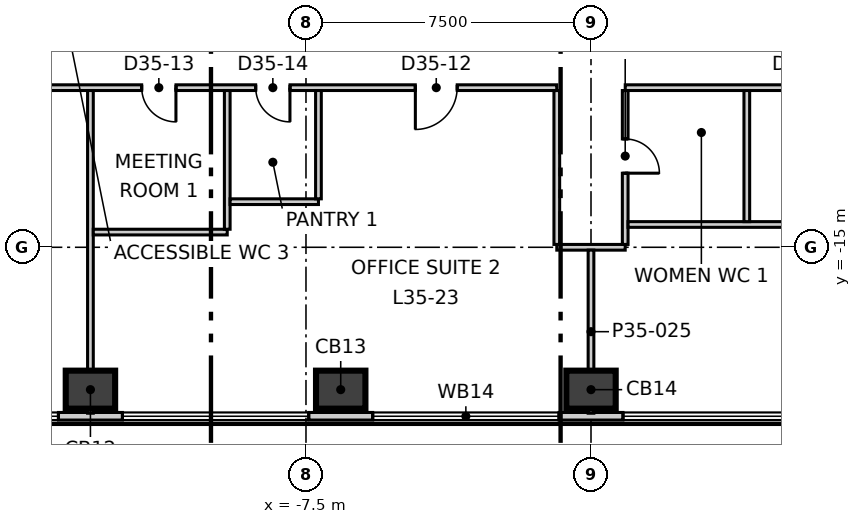
"""IFC4 building model, lengths in metres.
Left out: names, types, materials, properties, quantities, classifications, styles, units other than length and angle.
Written with IfcOpenShell. Run it as: python <this file> out.ifc"""

import sys

from ifc_helpers import new_model, si_unit, direction, frame, frame_2d, origin, origin_2d, place, context, subcontext, project, spatial, rectangle, extrude, element, fill, save


model = new_model("IFC4")
c1 = context("Model", 3, precision=1e-05, world=origin(), true_north=direction((0.0, 1.0)))
c2 = subcontext(c1, "Body", "Model", "MODEL_VIEW")
j1 = project(units=[si_unit("LENGTHUNIT", "METRE"), si_unit("PLANEANGLEUNIT", "RADIAN")], contexts=[c1])
p1 = place(None, origin())
s1 = spatial("IfcSite", under=j1, at=p1, CompositionType="ELEMENT")
p2 = place(p1, origin())
s2 = spatial("IfcBuilding", under=s1, at=p2, CompositionType="ELEMENT")
p3 = place(p2, frame((0.0, 0.0, 152.3)))
s3 = spatial("IfcBuildingStorey", under=s2, at=p3, CompositionType="ELEMENT", Elevation=152.3)
for number, where, z_axis, x_axis in (
    (1, (-13.172, -18.746, -0.3), (0.0, 0.0, 1.0), (1.0, 0.0, 0.0)),
    (2, (-6.586, -18.746, -0.3), (0.0, 0.0, 1.0), (1.0, 0.0, 0.0)),
    (3, (0.0, -18.746, -0.3), (0.0, 0.0, 1.0), (1.0, 0.0, 0.0)),
):
    element("IfcColumn", number, at=place(p3, frame(where, z_axis=z_axis, x_axis=x_axis)), inside=s3, PredefinedType="COLUMN", context=c2, shape_type="SweptSolid", body=[
        extrude(rectangle(XDim=1.3, YDim=1.0, at=origin_2d()), origin(), (0.0, 0.0, 1.0), 4.0),
    ])
p4 = place(p3, frame((-3.018, 33.666, 0.0), z_axis=(0.0, 0.0, 1.0), x_axis=(-0.499984613623, -0.866034286931, 0.0)))
e4 = element("IfcWall", 4, at=p4, inside=s3, PredefinedType="ELEMENTEDWALL", context=c2, shape_type="SweptSolid", body=[
    extrude(rectangle(XDim=55.274, YDim=0.2, at=frame_2d((27.637, 0.0))), origin(), (0.0, 0.0, 1.0), 3.7),
])
p5 = place(p4, frame((2.145, 0.0, 0.9)))
e5 = element("IfcOpeningElement", 5, at=p5, cuts=e4, PredefinedType="OPENING", context=c2, shape_type="SweptSolid", body=[
    extrude(rectangle(XDim=4.9, YDim=2.5, at=frame_2d((2.45, 1.25))), frame((0.0, 0.11, 0.0), z_axis=(0.0, -1.0, 0.0), x_axis=(1.0, 0.0, 0.0)), (0.0, 0.0, 1.0), 0.22),
])
p6 = place(p4, frame((8.731, 0.0, 0.9)))
e6 = element("IfcOpeningElement", 6, at=p6, cuts=e4, PredefinedType="OPENING", context=c2, shape_type="SweptSolid", body=[
    extrude(rectangle(XDim=4.9, YDim=2.5, at=frame_2d((2.45, 1.25))), frame((0.0, 0.11, 0.0), z_axis=(0.0, -1.0, 0.0), x_axis=(1.0, 0.0, 0.0)), (0.0, 0.0, 1.0), 0.22),
])
p7 = place(p4, frame((15.318, 0.0, 0.9)))
e7 = element("IfcOpeningElement", 7, at=p7, cuts=e4, PredefinedType="OPENING", context=c2, shape_type="SweptSolid", body=[
    extrude(rectangle(XDim=4.9, YDim=2.5, at=frame_2d((2.45, 1.25))), frame((0.0, 0.11, 0.0), z_axis=(0.0, -1.0, 0.0), x_axis=(1.0, 0.0, 0.0)), (0.0, 0.0, 1.0), 0.22),
])
p8 = place(p4, frame((21.904, 0.0, 0.9)))
e8 = element("IfcOpeningElement", 8, at=p8, cuts=e4, PredefinedType="OPENING", context=c2, shape_type="SweptSolid", body=[
    extrude(rectangle(XDim=4.9, YDim=2.5, at=frame_2d((2.45, 1.25))), frame((0.0, 0.11, 0.0), z_axis=(0.0, -1.0, 0.0), x_axis=(1.0, 0.0, 0.0)), (0.0, 0.0, 1.0), 0.22),
])
p9 = place(p4, frame((28.49, 0.0, 0.9)))
e9 = element("IfcOpeningElement", 9, at=p9, cuts=e4, PredefinedType="OPENING", context=c2, shape_type="SweptSolid", body=[
    extrude(rectangle(XDim=4.9, YDim=2.5, at=frame_2d((2.45, 1.25))), frame((0.0, 0.11, 0.0), z_axis=(0.0, -1.0, 0.0), x_axis=(1.0, 0.0, 0.0)), (0.0, 0.0, 1.0), 0.22),
])
p10 = place(p4, frame((35.076, 0.0, 0.9)))
e10 = element("IfcOpeningElement", 10, at=p10, cuts=e4, PredefinedType="OPENING", context=c2, shape_type="SweptSolid", body=[
    extrude(rectangle(XDim=4.9, YDim=2.5, at=frame_2d((2.45, 1.25))), frame((0.0, 0.11, 0.0), z_axis=(0.0, -1.0, 0.0), x_axis=(1.0, 0.0, 0.0)), (0.0, 0.0, 1.0), 0.22),
])
p11 = place(p4, frame((41.662, 0.0, 0.9)))
e11 = element("IfcOpeningElement", 11, at=p11, cuts=e4, PredefinedType="OPENING", context=c2, shape_type="SweptSolid", body=[
    extrude(rectangle(XDim=4.9, YDim=2.5, at=frame_2d((2.45, 1.25))), frame((0.0, 0.11, 0.0), z_axis=(0.0, -1.0, 0.0), x_axis=(1.0, 0.0, 0.0)), (0.0, 0.0, 1.0), 0.22),
])
p12 = place(p4, frame((48.248, 0.0, 0.9)))
e12 = element("IfcOpeningElement", 12, at=p12, cuts=e4, PredefinedType="OPENING", context=c2, shape_type="SweptSolid", body=[
    extrude(rectangle(XDim=4.9, YDim=2.5, at=frame_2d((2.45, 1.25))), frame((0.0, 0.11, 0.0), z_axis=(0.0, -1.0, 0.0), x_axis=(1.0, 0.0, 0.0)), (0.0, 0.0, 1.0), 0.22),
])
p13 = place(p3, frame((-27.647, -19.446, 0.0), z_axis=(0.0, 0.0, 1.0), x_axis=(1.0, 0.0, 0.0)))
e13 = element("IfcWall", 13, at=p13, inside=s3, PredefinedType="ELEMENTEDWALL", context=c2, shape_type="SweptSolid", body=[
    extrude(rectangle(XDim=55.274, YDim=0.2, at=frame_2d((27.637, 0.0))), origin(), (0.0, 0.0, 1.0), 3.7),
])
p14 = place(p13, frame((2.146, 0.0, 0.9)))
e14 = element("IfcOpeningElement", 14, at=p14, cuts=e13, PredefinedType="OPENING", context=c2, shape_type="SweptSolid", body=[
    extrude(rectangle(XDim=4.9, YDim=2.5, at=frame_2d((2.45, 1.25))), frame((0.0, 0.11, 0.0), z_axis=(0.0, -1.0, 0.0), x_axis=(1.0, 0.0, 0.0)), (0.0, 0.0, 1.0), 0.22),
])
p15 = place(p13, frame((8.732, 0.0, 0.9)))
e15 = element("IfcOpeningElement", 15, at=p15, cuts=e13, PredefinedType="OPENING", context=c2, shape_type="SweptSolid", body=[
    extrude(rectangle(XDim=4.9, YDim=2.5, at=frame_2d((2.45, 1.25))), frame((0.0, 0.11, 0.0), z_axis=(0.0, -1.0, 0.0), x_axis=(1.0, 0.0, 0.0)), (0.0, 0.0, 1.0), 0.22),
])
p16 = place(p13, frame((15.318, 0.0, 0.9)))
e16 = element("IfcOpeningElement", 16, at=p16, cuts=e13, PredefinedType="OPENING", context=c2, shape_type="SweptSolid", body=[
    extrude(rectangle(XDim=4.9, YDim=2.5, at=frame_2d((2.45, 1.25))), frame((0.0, 0.11, 0.0), z_axis=(0.0, -1.0, 0.0), x_axis=(1.0, 0.0, 0.0)), (0.0, 0.0, 1.0), 0.22),
])
p17 = place(p13, frame((21.904, 0.0, 0.9)))
e17 = element("IfcOpeningElement", 17, at=p17, cuts=e13, PredefinedType="OPENING", context=c2, shape_type="SweptSolid", body=[
    extrude(rectangle(XDim=4.9, YDim=2.5, at=frame_2d((2.45, 1.25))), frame((0.0, 0.11, 0.0), z_axis=(0.0, -1.0, 0.0), x_axis=(1.0, 0.0, 0.0)), (0.0, 0.0, 1.0), 0.22),
])
p18 = place(p13, frame((28.49, 0.0, 0.9)))
e18 = element("IfcOpeningElement", 18, at=p18, cuts=e13, PredefinedType="OPENING", context=c2, shape_type="SweptSolid", body=[
    extrude(rectangle(XDim=4.9, YDim=2.5, at=frame_2d((2.45, 1.25))), frame((0.0, 0.11, 0.0), z_axis=(0.0, -1.0, 0.0), x_axis=(1.0, 0.0, 0.0)), (0.0, 0.0, 1.0), 0.22),
])
p19 = place(p13, frame((35.076, 0.0, 0.9)))
e19 = element("IfcOpeningElement", 19, at=p19, cuts=e13, PredefinedType="OPENING", context=c2, shape_type="SweptSolid", body=[
    extrude(rectangle(XDim=4.9, YDim=2.5, at=frame_2d((2.45, 1.25))), frame((0.0, 0.11, 0.0), z_axis=(0.0, -1.0, 0.0), x_axis=(1.0, 0.0, 0.0)), (0.0, 0.0, 1.0), 0.22),
])
p20 = place(p13, frame((41.662, 0.0, 0.9)))
e20 = element("IfcOpeningElement", 20, at=p20, cuts=e13, PredefinedType="OPENING", context=c2, shape_type="SweptSolid", body=[
    extrude(rectangle(XDim=4.9, YDim=2.5, at=frame_2d((2.45, 1.25))), frame((0.0, 0.11, 0.0), z_axis=(0.0, -1.0, 0.0), x_axis=(1.0, 0.0, 0.0)), (0.0, 0.0, 1.0), 0.22),
])
p21 = place(p13, frame((48.248, 0.0, 0.9)))
e21 = element("IfcOpeningElement", 21, at=p21, cuts=e13, PredefinedType="OPENING", context=c2, shape_type="SweptSolid", body=[
    extrude(rectangle(XDim=4.9, YDim=2.5, at=frame_2d((2.45, 1.25))), frame((0.0, 0.11, 0.0), z_axis=(0.0, -1.0, 0.0), x_axis=(1.0, 0.0, 0.0)), (0.0, 0.0, 1.0), 0.22),
])
p22 = place(p3, frame((30.664, -14.22, 0.0), z_axis=(0.0, 0.0, 1.0), x_axis=(-0.499984613623, 0.866034286931, 0.0)))
e22 = element("IfcWall", 22, at=p22, inside=s3, PredefinedType="ELEMENTEDWALL", context=c2, shape_type="SweptSolid", body=[
    extrude(rectangle(XDim=55.274, YDim=0.2, at=frame_2d((27.637, 0.0))), origin(), (0.0, 0.0, 1.0), 3.7),
])
p23 = place(p22, frame((2.146, 0.0, 0.9)))
e23 = element("IfcOpeningElement", 23, at=p23, cuts=e22, PredefinedType="OPENING", context=c2, shape_type="SweptSolid", body=[
    extrude(rectangle(XDim=4.9, YDim=2.5, at=frame_2d((2.45, 1.25))), frame((0.0, 0.11, 0.0), z_axis=(0.0, -1.0, 0.0), x_axis=(1.0, 0.0, 0.0)), (0.0, 0.0, 1.0), 0.22),
])
p24 = place(p22, frame((8.732, 0.0, 0.9)))
e24 = element("IfcOpeningElement", 24, at=p24, cuts=e22, PredefinedType="OPENING", context=c2, shape_type="SweptSolid", body=[
    extrude(rectangle(XDim=4.9, YDim=2.5, at=frame_2d((2.45, 1.25))), frame((0.0, 0.11, 0.0), z_axis=(0.0, -1.0, 0.0), x_axis=(1.0, 0.0, 0.0)), (0.0, 0.0, 1.0), 0.22),
])
p25 = place(p22, frame((15.318, 0.0, 0.9)))
e25 = element("IfcOpeningElement", 25, at=p25, cuts=e22, PredefinedType="OPENING", context=c2, shape_type="SweptSolid", body=[
    extrude(rectangle(XDim=4.9, YDim=2.5, at=frame_2d((2.45, 1.25))), frame((0.0, 0.11, 0.0), z_axis=(0.0, -1.0, 0.0), x_axis=(1.0, 0.0, 0.0)), (0.0, 0.0, 1.0), 0.22),
])
p26 = place(p22, frame((21.904, 0.0, 0.9)))
e26 = element("IfcOpeningElement", 26, at=p26, cuts=e22, PredefinedType="OPENING", context=c2, shape_type="SweptSolid", body=[
    extrude(rectangle(XDim=4.9, YDim=2.5, at=frame_2d((2.45, 1.25))), frame((0.0, 0.11, 0.0), z_axis=(0.0, -1.0, 0.0), x_axis=(1.0, 0.0, 0.0)), (0.0, 0.0, 1.0), 0.22),
])
p27 = place(p22, frame((28.49, 0.0, 0.9)))
e27 = element("IfcOpeningElement", 27, at=p27, cuts=e22, PredefinedType="OPENING", context=c2, shape_type="SweptSolid", body=[
    extrude(rectangle(XDim=4.9, YDim=2.5, at=frame_2d((2.45, 1.25))), frame((0.0, 0.11, 0.0), z_axis=(0.0, -1.0, 0.0), x_axis=(1.0, 0.0, 0.0)), (0.0, 0.0, 1.0), 0.22),
])
p28 = place(p22, frame((35.076, 0.0, 0.9)))
e28 = element("IfcOpeningElement", 28, at=p28, cuts=e22, PredefinedType="OPENING", context=c2, shape_type="SweptSolid", body=[
    extrude(rectangle(XDim=4.9, YDim=2.5, at=frame_2d((2.45, 1.25))), frame((0.0, 0.11, 0.0), z_axis=(0.0, -1.0, 0.0), x_axis=(1.0, 0.0, 0.0)), (0.0, 0.0, 1.0), 0.22),
])
p29 = place(p22, frame((41.662, 0.0, 0.9)))
e29 = element("IfcOpeningElement", 29, at=p29, cuts=e22, PredefinedType="OPENING", context=c2, shape_type="SweptSolid", body=[
    extrude(rectangle(XDim=4.9, YDim=2.5, at=frame_2d((2.45, 1.25))), frame((0.0, 0.11, 0.0), z_axis=(0.0, -1.0, 0.0), x_axis=(1.0, 0.0, 0.0)), (0.0, 0.0, 1.0), 0.22),
])
p30 = place(p22, frame((48.248, 0.0, 0.9)))
e30 = element("IfcOpeningElement", 30, at=p30, cuts=e22, PredefinedType="OPENING", context=c2, shape_type="SweptSolid", body=[
    extrude(rectangle(XDim=4.9, YDim=2.5, at=frame_2d((2.45, 1.25))), frame((0.0, 0.11, 0.0), z_axis=(0.0, -1.0, 0.0), x_axis=(1.0, 0.0, 0.0)), (0.0, 0.0, 1.0), 0.22),
])
p31 = place(p3, frame((-18.556, -10.8, 0.0), z_axis=(0.0, 0.0, 1.0), x_axis=(1.0, 0.0, 0.0)))
e31 = element("IfcWall", 31, at=p31, inside=s3, PredefinedType="PARTITIONING", context=c2, shape_type="SweptSolid", body=[
    extrude(rectangle(XDim=17.655, YDim=0.15, at=frame_2d((8.828, 0.0))), origin(), (0.0, 0.0, 1.0), 3.7),
])
p32 = place(p31, frame((2.1, 0.0, 0.0)))
e32 = element("IfcOpeningElement", 32, at=p32, cuts=e31, PredefinedType="OPENING", context=c2, shape_type="SweptSolid", body=[
    extrude(rectangle(XDim=1.1, YDim=2.1, at=frame_2d((0.55, 1.05))), frame((0.0, 0.085, 0.0), z_axis=(0.0, -1.0, 0.0), x_axis=(1.0, 0.0, 0.0)), (0.0, 0.0, 1.0), 0.17),
])
p33 = place(p31, frame((13.934, 0.0, 0.0)))
e33 = element("IfcOpeningElement", 33, at=p33, cuts=e31, PredefinedType="OPENING", context=c2, shape_type="SweptSolid", body=[
    extrude(rectangle(XDim=1.1, YDim=2.1, at=frame_2d((0.55, 1.05))), frame((0.0, 0.085, 0.0), z_axis=(0.0, -1.0, 0.0), x_axis=(1.0, 0.0, 0.0)), (0.0, 0.0, 1.0), 0.17),
])
p34 = place(p31, frame((6.734, 0.0, 0.0)))
e34 = element("IfcOpeningElement", 34, at=p34, cuts=e31, PredefinedType="OPENING", context=c2, shape_type="SweptSolid", body=[
    extrude(rectangle(XDim=0.9, YDim=2.1, at=frame_2d((0.45, 1.05))), frame((0.0, 0.085, 0.0), z_axis=(0.0, -1.0, 0.0), x_axis=(1.0, 0.0, 0.0)), (0.0, 0.0, 1.0), 0.17),
])
p35 = place(p31, frame((9.734, 0.0, 0.0)))
e35 = element("IfcOpeningElement", 35, at=p35, cuts=e31, PredefinedType="OPENING", context=c2, shape_type="SweptSolid", body=[
    extrude(rectangle(XDim=0.9, YDim=2.1, at=frame_2d((0.45, 1.05))), frame((0.0, 0.085, 0.0), z_axis=(0.0, -1.0, 0.0), x_axis=(1.0, 0.0, 0.0)), (0.0, 0.0, 1.0), 0.17),
])
p36 = place(p3, frame((0.901, -10.8, 0.0), z_axis=(0.0, 0.0, 1.0), x_axis=(1.0, 0.0, 0.0)))
e36 = element("IfcWall", 36, at=p36, inside=s3, PredefinedType="PARTITIONING", context=c2, shape_type="SweptSolid", body=[
    extrude(rectangle(XDim=17.805, YDim=0.15, at=frame_2d((8.903, 0.0))), origin(), (0.0, 0.0, 1.0), 3.7),
])
p37 = place(p36, frame((9.949, 0.0, 0.0)))
e37 = element("IfcOpeningElement", 37, at=p37, cuts=e36, PredefinedType="OPENING", context=c2, shape_type="SweptSolid", body=[
    extrude(rectangle(XDim=1.1, YDim=2.1, at=frame_2d((0.55, 1.05))), frame((0.0, 0.085, 0.0), z_axis=(0.0, -1.0, 0.0), x_axis=(1.0, 0.0, 0.0)), (0.0, 0.0, 1.0), 0.17),
])
p38 = place(p36, frame((4.349, 0.0, 0.0)))
e38 = element("IfcOpeningElement", 38, at=p38, cuts=e36, PredefinedType="OPENING", context=c2, shape_type="SweptSolid", body=[
    extrude(rectangle(XDim=0.9, YDim=2.1, at=frame_2d((0.45, 1.05))), frame((0.0, 0.085, 0.0), z_axis=(0.0, -1.0, 0.0), x_axis=(1.0, 0.0, 0.0)), (0.0, 0.0, 1.0), 0.17),
])
p39 = place(p36, frame((7.049, 0.0, 0.0)))
e39 = element("IfcOpeningElement", 39, at=p39, cuts=e36, PredefinedType="OPENING", context=c2, shape_type="SweptSolid", body=[
    extrude(rectangle(XDim=1.0, YDim=2.1, at=frame_2d((0.5, 1.05))), frame((0.0, 0.085, 0.0), z_axis=(0.0, -1.0, 0.0), x_axis=(1.0, 0.0, 0.0)), (0.0, 0.0, 1.0), 0.17),
])
p40 = place(p36, frame((14.521, 0.0, 0.0)))
e40 = element("IfcOpeningElement", 40, at=p40, cuts=e36, PredefinedType="OPENING", context=c2, shape_type="SweptSolid", body=[
    extrude(rectangle(XDim=1.1, YDim=2.1, at=frame_2d((0.55, 1.05))), frame((0.0, 0.085, 0.0), z_axis=(0.0, -1.0, 0.0), x_axis=(1.0, 0.0, 0.0)), (0.0, 0.0, 1.0), 0.17),
])
p41 = place(p3, frame((-18.631, -10.67, 0.0), z_axis=(0.0, 0.0, 1.0), x_axis=(0.500017706633, 0.866015180614, 0.0)))
e41 = element("IfcWall", 41, at=p41, inside=s3, PredefinedType="PARTITIONING", context=c2, shape_type="SweptSolid", body=[
    extrude(rectangle(XDim=17.656, YDim=0.15, at=frame_2d((8.828, 0.0))), origin(), (0.0, 0.0, 1.0), 3.7),
])
p42 = place(p41, frame((6.606, 0.0, 0.0)))
e42 = element("IfcOpeningElement", 42, at=p42, cuts=e41, PredefinedType="OPENING", context=c2, shape_type="SweptSolid", body=[
    extrude(rectangle(XDim=1.1, YDim=2.1, at=frame_2d((0.55, 1.05))), frame((0.0, 0.085, 0.0), z_axis=(0.0, -1.0, 0.0), x_axis=(1.0, 0.0, 0.0)), (0.0, 0.0, 1.0), 0.17),
])
p43 = place(p41, frame((12.406, 0.0, 0.0)))
e43 = element("IfcOpeningElement", 43, at=p43, cuts=e41, PredefinedType="OPENING", context=c2, shape_type="SweptSolid", body=[
    extrude(rectangle(XDim=0.9, YDim=2.1, at=frame_2d((0.45, 1.05))), frame((0.0, 0.085, 0.0), z_axis=(0.0, -1.0, 0.0), x_axis=(1.0, 0.0, 0.0)), (0.0, 0.0, 1.0), 0.17),
])
p44 = place(p41, frame((9.606, 0.0, 0.0)))
e44 = element("IfcOpeningElement", 44, at=p44, cuts=e41, PredefinedType="OPENING", context=c2, shape_type="SweptSolid", body=[
    extrude(rectangle(XDim=1.0, YDim=2.1, at=frame_2d((0.5, 1.05))), frame((0.0, 0.085, 0.0), z_axis=(0.0, -1.0, 0.0), x_axis=(1.0, 0.0, 0.0)), (0.0, 0.0, 1.0), 0.17),
])
p45 = place(p41, frame((2.034, 0.0, 0.0)))
e45 = element("IfcOpeningElement", 45, at=p45, cuts=e41, PredefinedType="OPENING", context=c2, shape_type="SweptSolid", body=[
    extrude(rectangle(XDim=1.1, YDim=2.1, at=frame_2d((0.55, 1.05))), frame((0.0, 0.085, 0.0), z_axis=(0.0, -1.0, 0.0), x_axis=(1.0, 0.0, 0.0)), (0.0, 0.0, 1.0), 0.17),
])
p46 = place(p3, frame((-13.172, -19.366, 0.0), z_axis=(0.0, 0.0, 1.0), x_axis=(0.0, 1.0, 0.0)))
e46 = element("IfcWall", 46, at=p46, inside=s3, PredefinedType="PARTITIONING", context=c2, shape_type="SweptSolid", body=[
    extrude(rectangle(XDim=8.491, YDim=0.15, at=frame_2d((4.246, 0.0))), origin(), (0.0, 0.0, 1.0), 3.7),
])
p47 = place(p3, frame((-13.097, -14.6, 0.0), z_axis=(0.0, 0.0, 1.0), x_axis=(1.0, 0.0, 0.0)))
e47 = element("IfcWall", 47, at=p47, inside=s3, PredefinedType="PARTITIONING", context=c2, shape_type="SweptSolid", body=[
    extrude(rectangle(XDim=3.525, YDim=0.15, at=frame_2d((1.762, 0.0))), origin(), (0.0, 0.0, 1.0), 3.7),
])
p48 = place(p3, frame((-9.572, -14.525, 0.0), z_axis=(0.0, 0.0, 1.0), x_axis=(0.0, 1.0, 0.0)))
e48 = element("IfcWall", 48, at=p48, inside=s3, PredefinedType="PARTITIONING", context=c2, shape_type="SweptSolid", body=[
    extrude(rectangle(XDim=3.65, YDim=0.15, at=frame_2d((1.825, 0.0))), origin(), (0.0, 0.0, 1.0), 3.7),
])
p49 = place(p3, frame((-9.497, -13.8, 0.0), z_axis=(0.0, 0.0, 1.0), x_axis=(1.0, 0.0, 0.0)))
e49 = element("IfcWall", 49, at=p49, inside=s3, PredefinedType="PARTITIONING", context=c2, shape_type="SweptSolid", body=[
    extrude(rectangle(XDim=2.325, YDim=0.15, at=frame_2d((1.163, 0.0))), origin(), (0.0, 0.0, 1.0), 3.7),
])
p50 = place(p3, frame((-7.172, -13.725, 0.0), z_axis=(0.0, 0.0, 1.0), x_axis=(0.0, 1.0, 0.0)))
e50 = element("IfcWall", 50, at=p50, inside=s3, PredefinedType="PARTITIONING", context=c2, shape_type="SweptSolid", body=[
    extrude(rectangle(XDim=2.85, YDim=0.15, at=frame_2d((1.425, 0.0))), origin(), (0.0, 0.0, 1.0), 3.7),
])
p51 = place(p3, frame((-0.9, -15.0, 0.0), z_axis=(0.0, 0.0, 1.0), x_axis=(1.0, 0.0, 0.0)))
e51 = element("IfcWall", 51, at=p51, inside=s3, PredefinedType="PARTITIONING", context=c2, shape_type="SweptSolid", body=[
    extrude(rectangle(XDim=1.8, YDim=0.15, at=frame_2d((0.9, 0.0))), origin(), (0.0, 0.0, 1.0), 3.7),
])
p52 = place(p3, frame((-0.9, -14.925, 0.0), z_axis=(0.0, 0.0, 1.0), x_axis=(0.0, 1.0, 0.0)))
e52 = element("IfcWall", 52, at=p52, inside=s3, PredefinedType="PARTITIONING", context=c2, shape_type="SweptSolid", body=[
    extrude(rectangle(XDim=4.049, YDim=0.15, at=frame_2d((2.024, 0.0))), origin(), (0.0, 0.0, 1.0), 3.7),
])
p53 = place(p3, frame((0.0, -19.366, 0.0), z_axis=(0.0, 0.0, 1.0), x_axis=(0.0, 1.0, 0.0)))
e53 = element("IfcWall", 53, at=p53, inside=s3, PredefinedType="PARTITIONING", context=c2, shape_type="SweptSolid", body=[
    extrude(rectangle(XDim=4.291, YDim=0.15, at=frame_2d((2.146, 0.0))), origin(), (0.0, 0.0, 1.0), 3.2),
])
p54 = place(p3, frame((0.9, -14.925, 0.0), z_axis=(0.0, 0.0, 1.0), x_axis=(0.0, 1.0, 0.0)))
e54 = element("IfcWall", 54, at=p54, inside=s3, PredefinedType="PARTITIONING", context=c2, shape_type="SweptSolid", body=[
    extrude(rectangle(XDim=4.049, YDim=0.15, at=frame_2d((2.024, 0.0))), origin(), (0.0, 0.0, 1.0), 3.7),
])
p55 = place(p54, frame((1.875, 0.0, 0.0)))
e55 = element("IfcOpeningElement", 55, at=p55, cuts=e54, PredefinedType="OPENING", context=c2, shape_type="SweptSolid", body=[
    extrude(rectangle(XDim=0.9, YDim=2.1, at=frame_2d((0.45, 1.05))), frame((0.0, 0.085, 0.0), z_axis=(0.0, -1.0, 0.0), x_axis=(1.0, 0.0, 0.0)), (0.0, 0.0, 1.0), 0.17),
])
p56 = place(p3, frame((0.975, -14.4, 0.0), z_axis=(0.0, 0.0, 1.0), x_axis=(1.0, 0.0, 0.0)))
e56 = element("IfcWall", 56, at=p56, inside=s3, PredefinedType="PARTITIONING", context=c2, shape_type="SweptSolid", body=[
    extrude(rectangle(XDim=8.725, YDim=0.15, at=frame_2d((4.362, 0.0))), origin(), (0.0, 0.0, 1.0), 3.7),
])
p57 = place(p3, frame((4.1, -14.325, 0.0), z_axis=(0.0, 0.0, 1.0), x_axis=(0.0, 1.0, 0.0)))
e57 = element("IfcWall", 57, at=p57, inside=s3, PredefinedType="PARTITIONING", context=c2, shape_type="SweptSolid", body=[
    extrude(rectangle(XDim=3.45, YDim=0.15, at=frame_2d((1.725, 0.0))), origin(), (0.0, 0.0, 1.0), 3.7),
])
p58 = place(p15, origin())
e58 = element("IfcWindow", 58, at=p58, inside=s3, PartitioningType="SINGLE_PANEL", PredefinedType="WINDOW", context=c2, shape_type="SweptSolid", body=[
    extrude(rectangle(XDim=4.9, YDim=2.5, at=frame_2d((2.45, 1.25))), frame((0.0, 0.03, 0.0), z_axis=(0.0, -1.0, 0.0), x_axis=(1.0, 0.0, 0.0)), (0.0, 0.0, 1.0), 0.06),
])
fill(e15, e58)
p59 = place(p16, origin())
e59 = element("IfcWindow", 59, at=p59, inside=s3, PartitioningType="SINGLE_PANEL", PredefinedType="WINDOW", context=c2, shape_type="SweptSolid", body=[
    extrude(rectangle(XDim=4.9, YDim=2.5, at=frame_2d((2.45, 1.25))), frame((0.0, 0.03, 0.0), z_axis=(0.0, -1.0, 0.0), x_axis=(1.0, 0.0, 0.0)), (0.0, 0.0, 1.0), 0.06),
])
fill(e16, e59)
p60 = place(p17, origin())
e60 = element("IfcWindow", 60, at=p60, inside=s3, PartitioningType="SINGLE_PANEL", PredefinedType="WINDOW", context=c2, shape_type="SweptSolid", body=[
    extrude(rectangle(XDim=4.9, YDim=2.5, at=frame_2d((2.45, 1.25))), frame((0.0, 0.03, 0.0), z_axis=(0.0, -1.0, 0.0), x_axis=(1.0, 0.0, 0.0)), (0.0, 0.0, 1.0), 0.06),
])
fill(e17, e60)
p61 = place(p18, origin())
e61 = element("IfcWindow", 61, at=p61, inside=s3, PartitioningType="SINGLE_PANEL", PredefinedType="WINDOW", context=c2, shape_type="SweptSolid", body=[
    extrude(rectangle(XDim=4.9, YDim=2.5, at=frame_2d((2.45, 1.25))), frame((0.0, 0.03, 0.0), z_axis=(0.0, -1.0, 0.0), x_axis=(1.0, 0.0, 0.0)), (0.0, 0.0, 1.0), 0.06),
])
fill(e18, e61)
p62 = place(p33, origin())
e62 = element("IfcDoor", 62, at=p62, inside=s3, OperationType="SINGLE_SWING_LEFT", PredefinedType="DOOR", context=c2, shape_type="SweptSolid", body=[
    extrude(rectangle(XDim=1.1, YDim=2.1, at=frame_2d((0.55, 1.05))), frame((0.0, 0.025, 0.0), z_axis=(0.0, -1.0, 0.0), x_axis=(1.0, 0.0, 0.0)), (0.0, 0.0, 1.0), 0.05),
])
fill(e33, e62)
p63 = place(p34, origin())
e63 = element("IfcDoor", 63, at=p63, inside=s3, OperationType="SINGLE_SWING_RIGHT", PredefinedType="DOOR", context=c2, shape_type="SweptSolid", body=[
    extrude(rectangle(XDim=0.9, YDim=2.1, at=frame_2d((0.45, 1.05))), frame((0.0, 0.025, 0.0), z_axis=(0.0, -1.0, 0.0), x_axis=(1.0, 0.0, 0.0)), (0.0, 0.0, 1.0), 0.05),
])
fill(e34, e63)
p64 = place(p35, origin())
e64 = element("IfcDoor", 64, at=p64, inside=s3, OperationType="SINGLE_SWING_RIGHT", PredefinedType="DOOR", context=c2, shape_type="SweptSolid", body=[
    extrude(rectangle(XDim=0.9, YDim=2.1, at=frame_2d((0.45, 1.05))), frame((0.0, 0.025, 0.0), z_axis=(0.0, -1.0, 0.0), x_axis=(1.0, 0.0, 0.0)), (0.0, 0.0, 1.0), 0.05),
])
fill(e35, e64)
p65 = place(p55, origin())
e65 = element("IfcDoor", 65, at=p65, inside=s3, OperationType="SINGLE_SWING_LEFT", PredefinedType="DOOR", context=c2, shape_type="SweptSolid", body=[
    extrude(rectangle(XDim=0.9, YDim=2.1, at=frame_2d((0.45, 1.05))), frame((0.0, 0.025, 0.0), z_axis=(0.0, -1.0, 0.0), x_axis=(1.0, 0.0, 0.0)), (0.0, 0.0, 1.0), 0.05),
])
fill(e55, e65)
save(model, sys.argv[1])
